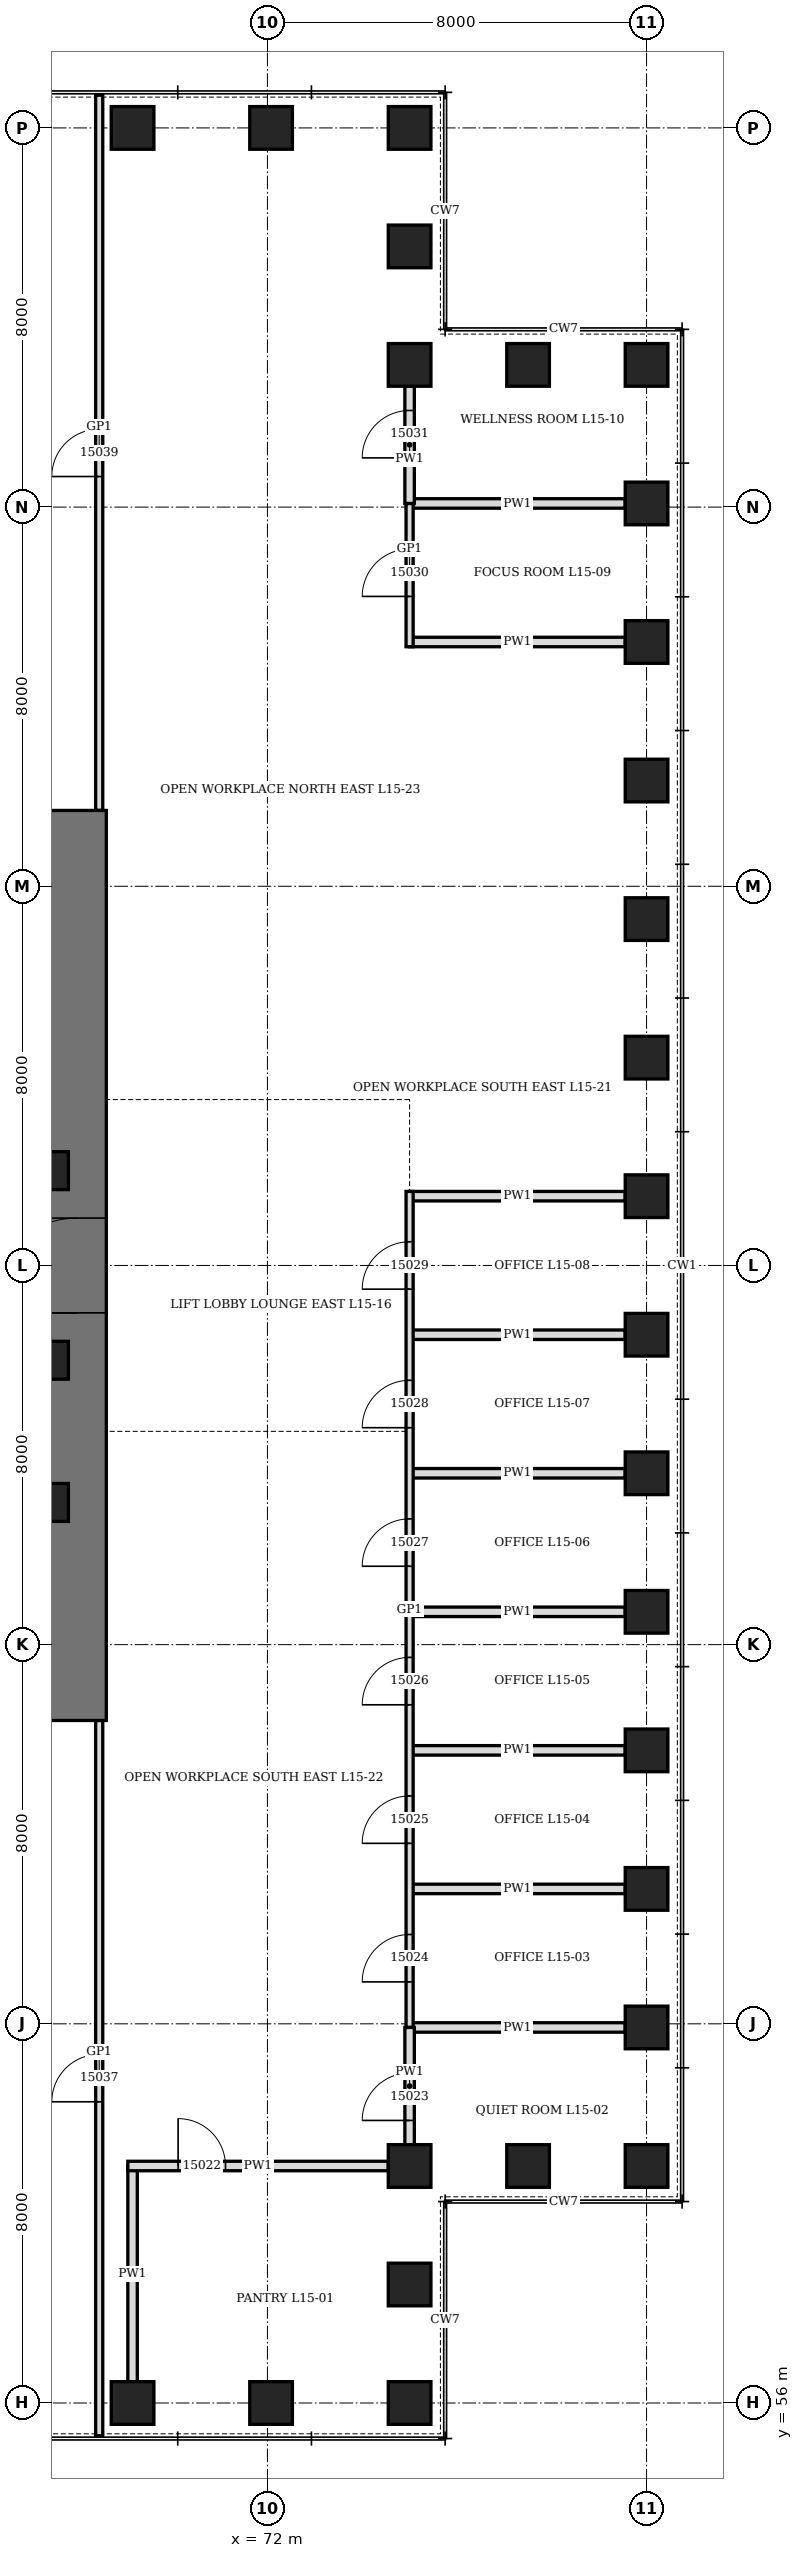
"""IFC4 building model, lengths in metres.
Left out: names, types, materials, properties, quantities, classifications, styles, units other than length and angle.
Written with IfcOpenShell. Run it as: python <this file> out.ifc"""

import sys

from ifc_helpers import new_model, si_unit, direction, frame, frame_2d, origin, origin_2d, place, context, subcontext, project, spatial, rectangle, hollow_rectangle, extrude, element, fill, save


model = new_model("IFC4")
c1 = context("Model", 3, precision=1e-05, world=origin(), true_north=direction((0.0, 1.0)))
c2 = subcontext(c1, "Body", "Model", "MODEL_VIEW")
j1 = project(units=[si_unit("LENGTHUNIT", "METRE"), si_unit("PLANEANGLEUNIT", "RADIAN")], contexts=[c1])
p1 = place(None, origin())
s1 = spatial("IfcSite", under=j1, at=p1, CompositionType="ELEMENT")
p2 = place(p1, origin())
s2 = spatial("IfcBuilding", under=s1, at=p2, CompositionType="ELEMENT")
p3 = place(p2, frame((0.0, 0.0, 72.7)))
s3 = spatial("IfcBuildingStorey", under=s2, at=p3, CompositionType="ELEMENT", Elevation=72.7)
for number, where, z_axis, x_axis in (
    (1, (69.154, 56.0, 0.0), (0.0, 0.0, 1.0), (1.0, 0.0, 0.0)),
    (2, (72.077, 56.0, 0.0), (0.0, 0.0, 1.0), (1.0, 0.0, 0.0)),
    (3, (75.0, 56.0, 0.0), (0.0, 0.0, 1.0), (0.0, 1.0, 0.0)),
    (4, (75.0, 58.5, 0.0), (0.0, 0.0, 1.0), (0.0, 1.0, 0.0)),
    (5, (75.0, 61.0, 0.0), (0.0, 0.0, 1.0), (1.0, 0.0, 0.0)),
    (6, (77.5, 61.0, 0.0), (0.0, 0.0, 1.0), (1.0, 0.0, 0.0)),
    (7, (80.0, 61.0, 0.0), (0.0, 0.0, 1.0), (0.0, 1.0, 0.0)),
    (8, (80.0, 63.923, 0.0), (0.0, 0.0, 1.0), (0.0, 1.0, 0.0)),
    (9, (80.0, 66.846, 0.0), (0.0, 0.0, 1.0), (0.0, 1.0, 0.0)),
    (10, (80.0, 69.769, 0.0), (0.0, 0.0, 1.0), (0.0, 1.0, 0.0)),
    (11, (80.0, 72.692, 0.0), (0.0, 0.0, 1.0), (0.0, 1.0, 0.0)),
    (12, (80.0, 75.615, 0.0), (0.0, 0.0, 1.0), (0.0, 1.0, 0.0)),
    (13, (80.0, 78.539, 0.0), (0.0, 0.0, 1.0), (0.0, 1.0, 0.0)),
    (14, (80.0, 81.461, 0.0), (0.0, 0.0, 1.0), (0.0, 1.0, 0.0)),
    (15, (80.0, 84.385, 0.0), (0.0, 0.0, 1.0), (0.0, 1.0, 0.0)),
    (16, (80.0, 87.308, 0.0), (0.0, 0.0, 1.0), (0.0, 1.0, 0.0)),
    (17, (80.0, 90.231, 0.0), (0.0, 0.0, 1.0), (0.0, 1.0, 0.0)),
    (18, (80.0, 93.154, 0.0), (0.0, 0.0, 1.0), (0.0, 1.0, 0.0)),
    (19, (80.0, 96.077, 0.0), (0.0, 0.0, 1.0), (0.0, 1.0, 0.0)),
    (20, (80.0, 99.0, 0.0), (0.0, 0.0, 1.0), (1.0, 0.0, 0.0)),
    (21, (77.5, 99.0, 0.0), (0.0, 0.0, 1.0), (1.0, 0.0, 0.0)),
    (22, (75.0, 99.0, 0.0), (0.0, 0.0, 1.0), (0.0, 1.0, 0.0)),
    (23, (75.0, 101.5, 0.0), (0.0, 0.0, 1.0), (0.0, 1.0, 0.0)),
    (24, (75.0, 104.0, 0.0), (0.0, 0.0, 1.0), (1.0, 0.0, 0.0)),
    (25, (72.077, 104.0, 0.0), (0.0, 0.0, 1.0), (1.0, 0.0, 0.0)),
    (26, (69.154, 104.0, 0.0), (0.0, 0.0, 1.0), (1.0, 0.0, 0.0)),
):
    element("IfcColumn", number, at=place(p3, frame(where, z_axis=z_axis, x_axis=x_axis)), inside=s3, PredefinedType="COLUMN", context=c2, shape_type="SweptSolid", body=[
        extrude(hollow_rectangle(XDim=0.9, YDim=0.9, WallThickness=0.12, at=origin_2d()), origin(), (0.0, 0.0, 1.0), 4.2),
    ])
p4 = place(p3, frame((68.0, 70.4, 0.0), z_axis=(0.0, 0.0, 1.0), x_axis=(0.0, 1.0, 0.0)))
e27 = element("IfcWall", 27, at=p4, inside=s3, PredefinedType="SHEAR", context=c2, shape_type="SweptSolid", body=[
    extrude(rectangle(XDim=19.2, YDim=1.2, at=frame_2d((9.6, 0.0))), origin(), (0.0, 0.0, 1.0), 4.2),
])
p5 = place(p4, frame((8.6, 0.0, 0.0)))
e28 = element("IfcOpeningElement", 28, at=p5, cuts=e27, PredefinedType="OPENING", context=c2, shape_type="SweptSolid", body=[
    extrude(rectangle(XDim=2.0, YDim=2.4, at=frame_2d((1.0, 1.2))), frame((0.0, 0.61, 0.0), z_axis=(0.0, -1.0, 0.0), x_axis=(1.0, 0.0, 0.0)), (0.0, 0.0, 1.0), 1.22),
])
for number, where, z_axis, x_axis in (
    (29, (67.4, 75.0, 0.0), (0.0, 0.0, 1.0), (1.0, 0.0, 0.0)),
    (30, (67.4, 78.0, 0.0), (0.0, 0.0, 1.0), (1.0, 0.0, 0.0)),
    (31, (67.4, 82.0, 0.0), (0.0, 0.0, 1.0), (1.0, 0.0, 0.0)),
):
    element("IfcColumn", number, at=place(p3, frame(where, z_axis=z_axis, x_axis=x_axis)), inside=s3, PredefinedType="COLUMN", context=c2, shape_type="SweptSolid", body=[
        extrude(hollow_rectangle(XDim=0.8, YDim=0.8, WallThickness=0.1, at=origin_2d()), origin(), (0.0, 0.0, 1.0), 4.2),
    ])
p6 = place(p3, frame((69.154, 56.45, 0.0), z_axis=(0.0, 0.0, 1.0), x_axis=(0.0, 1.0, 0.0)))
e32 = element("IfcWall", 32, at=p6, inside=s3, PredefinedType="PARTITIONING", context=c2, shape_type="SweptSolid", body=[
    extrude(rectangle(XDim=4.55, YDim=0.2, at=frame_2d((2.275, 0.0))), origin(), (0.0, 0.0, 1.0), 3.278),
])
for number, where, z_axis, x_axis in (
    (33, (75.0, 63.923, 0.0), (0.0, 0.0, 1.0), (1.0, 0.0, 0.0)),
    (34, (75.0, 66.846, 0.0), (0.0, 0.0, 1.0), (1.0, 0.0, 0.0)),
    (35, (75.0, 69.769, 0.0), (0.0, 0.0, 1.0), (1.0, 0.0, 0.0)),
    (36, (75.0, 72.692, 0.0), (0.0, 0.0, 1.0), (1.0, 0.0, 0.0)),
    (37, (75.0, 75.615, 0.0), (0.0, 0.0, 1.0), (1.0, 0.0, 0.0)),
    (38, (75.0, 78.539, 0.0), (0.0, 0.0, 1.0), (1.0, 0.0, 0.0)),
    (39, (75.0, 81.461, 0.0), (0.0, 0.0, 1.0), (1.0, 0.0, 0.0)),
    (40, (75.0, 93.154, 0.0), (0.0, 0.0, 1.0), (1.0, 0.0, 0.0)),
    (41, (75.0, 96.077, 0.0), (0.0, 0.0, 1.0), (1.0, 0.0, 0.0)),
):
    element("IfcWall", number, at=place(p3, frame(where, z_axis=z_axis, x_axis=x_axis)), inside=s3, PredefinedType="PARTITIONING", context=c2, shape_type="SweptSolid", body=[
        extrude(rectangle(XDim=4.55, YDim=0.2, at=frame_2d((2.275, 0.0))), origin(), (0.0, 0.0, 1.0), 3.428),
    ])
p7 = place(p3, frame((69.054, 61.0, 0.0), z_axis=(0.0, 0.0, 1.0), x_axis=(1.0, 0.0, 0.0)))
e42 = element("IfcWall", 42, at=p7, inside=s3, PredefinedType="PARTITIONING", context=c2, shape_type="SweptSolid", body=[
    extrude(rectangle(XDim=5.496, YDim=0.2, at=frame_2d((2.748, 0.0))), origin(), (0.0, 0.0, 1.0), 4.04),
])
p8 = place(p7, frame((1.062, 0.0, 0.0)))
e43 = element("IfcOpeningElement", 43, at=p8, cuts=e42, PredefinedType="OPENING", context=c2, shape_type="SweptSolid", body=[
    extrude(rectangle(XDim=1.0, YDim=2.1, at=frame_2d((0.5, 1.05))), frame((0.0, 0.11, 0.0), z_axis=(0.0, -1.0, 0.0), x_axis=(1.0, 0.0, 0.0)), (0.0, 0.0, 1.0), 0.22),
])
p9 = place(p3, frame((68.45, 55.31, 0.0), z_axis=(0.0, 0.0, 1.0), x_axis=(0.0, 1.0, 0.0)))
e44 = element("IfcWall", 44, at=p9, inside=s3, PredefinedType="PARTITIONING", context=c2, shape_type="SweptSolid", body=[
    extrude(rectangle(XDim=15.09, YDim=0.15, at=frame_2d((7.545, 0.0))), origin(), (0.0, 0.0, 1.0), 4.04),
])
p10 = place(p9, frame((7.045, 0.0, 0.0)))
e45 = element("IfcOpeningElement", 45, at=p10, cuts=e44, PredefinedType="OPENING", context=c2, shape_type="SweptSolid", body=[
    extrude(rectangle(XDim=1.0, YDim=2.4, at=frame_2d((0.5, 1.2))), frame((0.0, 0.085, 0.0), z_axis=(0.0, -1.0, 0.0), x_axis=(1.0, 0.0, 0.0)), (0.0, 0.0, 1.0), 0.17),
])
p11 = place(p3, frame((68.45, 89.6, 0.0), z_axis=(0.0, 0.0, 1.0), x_axis=(0.0, 1.0, 0.0)))
e46 = element("IfcWall", 46, at=p11, inside=s3, PredefinedType="PARTITIONING", context=c2, shape_type="SweptSolid", body=[
    extrude(rectangle(XDim=15.09, YDim=0.15, at=frame_2d((7.545, 0.0))), origin(), (0.0, 0.0, 1.0), 4.04),
])
p12 = place(p11, frame((7.045, 0.0, 0.0)))
e47 = element("IfcOpeningElement", 47, at=p12, cuts=e46, PredefinedType="OPENING", context=c2, shape_type="SweptSolid", body=[
    extrude(rectangle(XDim=1.0, YDim=2.4, at=frame_2d((0.5, 1.2))), frame((0.0, 0.085, 0.0), z_axis=(0.0, -1.0, 0.0), x_axis=(1.0, 0.0, 0.0)), (0.0, 0.0, 1.0), 0.17),
])
p13 = place(p3, frame((75.0, 63.923, 0.0), z_axis=(0.0, 0.0, 1.0), x_axis=(0.0, 1.0, 0.0)))
e48 = element("IfcWall", 48, at=p13, inside=s3, PredefinedType="PARTITIONING", context=c2, shape_type="SweptSolid", body=[
    extrude(rectangle(XDim=17.638, YDim=0.15, at=frame_2d((8.819, 0.0))), origin(), (0.0, 0.0, 1.0), 4.04),
])
p14 = place(p13, frame((0.961, 0.0, 0.0)))
e49 = element("IfcOpeningElement", 49, at=p14, cuts=e48, PredefinedType="OPENING", context=c2, shape_type="SweptSolid", body=[
    extrude(rectangle(XDim=1.0, YDim=2.1, at=frame_2d((0.5, 1.05))), frame((0.0, 0.085, 0.0), z_axis=(0.0, -1.0, 0.0), x_axis=(1.0, 0.0, 0.0)), (0.0, 0.0, 1.0), 0.17),
])
p15 = place(p13, frame((3.885, 0.0, 0.0)))
e50 = element("IfcOpeningElement", 50, at=p15, cuts=e48, PredefinedType="OPENING", context=c2, shape_type="SweptSolid", body=[
    extrude(rectangle(XDim=1.0, YDim=2.1, at=frame_2d((0.5, 1.05))), frame((0.0, 0.085, 0.0), z_axis=(0.0, -1.0, 0.0), x_axis=(1.0, 0.0, 0.0)), (0.0, 0.0, 1.0), 0.17),
])
p16 = place(p13, frame((6.808, 0.0, 0.0)))
e51 = element("IfcOpeningElement", 51, at=p16, cuts=e48, PredefinedType="OPENING", context=c2, shape_type="SweptSolid", body=[
    extrude(rectangle(XDim=1.0, YDim=2.1, at=frame_2d((0.5, 1.05))), frame((0.0, 0.085, 0.0), z_axis=(0.0, -1.0, 0.0), x_axis=(1.0, 0.0, 0.0)), (0.0, 0.0, 1.0), 0.17),
])
p17 = place(p13, frame((9.731, 0.0, 0.0)))
e52 = element("IfcOpeningElement", 52, at=p17, cuts=e48, PredefinedType="OPENING", context=c2, shape_type="SweptSolid", body=[
    extrude(rectangle(XDim=1.0, YDim=2.1, at=frame_2d((0.5, 1.05))), frame((0.0, 0.085, 0.0), z_axis=(0.0, -1.0, 0.0), x_axis=(1.0, 0.0, 0.0)), (0.0, 0.0, 1.0), 0.17),
])
p18 = place(p13, frame((12.654, 0.0, 0.0)))
e53 = element("IfcOpeningElement", 53, at=p18, cuts=e48, PredefinedType="OPENING", context=c2, shape_type="SweptSolid", body=[
    extrude(rectangle(XDim=1.0, YDim=2.1, at=frame_2d((0.5, 1.05))), frame((0.0, 0.085, 0.0), z_axis=(0.0, -1.0, 0.0), x_axis=(1.0, 0.0, 0.0)), (0.0, 0.0, 1.0), 0.17),
])
p19 = place(p13, frame((15.577, 0.0, 0.0)))
e54 = element("IfcOpeningElement", 54, at=p19, cuts=e48, PredefinedType="OPENING", context=c2, shape_type="SweptSolid", body=[
    extrude(rectangle(XDim=1.0, YDim=2.1, at=frame_2d((0.5, 1.05))), frame((0.0, 0.085, 0.0), z_axis=(0.0, -1.0, 0.0), x_axis=(1.0, 0.0, 0.0)), (0.0, 0.0, 1.0), 0.17),
])
p20 = place(p3, frame((75.0, 93.054, 0.0), z_axis=(0.0, 0.0, 1.0), x_axis=(0.0, 1.0, 0.0)))
e55 = element("IfcWall", 55, at=p20, inside=s3, PredefinedType="PARTITIONING", context=c2, shape_type="SweptSolid", body=[
    extrude(rectangle(XDim=3.023, YDim=0.15, at=frame_2d((1.511, 0.0))), origin(), (0.0, 0.0, 1.0), 4.04),
])
p21 = place(p20, frame((1.062, 0.0, 0.0)))
e56 = element("IfcOpeningElement", 56, at=p21, cuts=e55, PredefinedType="OPENING", context=c2, shape_type="SweptSolid", body=[
    extrude(rectangle(XDim=1.0, YDim=2.4, at=frame_2d((0.5, 1.2))), frame((0.0, 0.085, 0.0), z_axis=(0.0, -1.0, 0.0), x_axis=(1.0, 0.0, 0.0)), (0.0, 0.0, 1.0), 0.17),
])
p22 = place(p3, frame((75.0, 61.45, 0.0), z_axis=(0.0, 0.0, 1.0), x_axis=(0.0, 1.0, 0.0)))
e57 = element("IfcWall", 57, at=p22, inside=s3, PredefinedType="PARTITIONING", context=c2, shape_type="SweptSolid", body=[
    extrude(rectangle(XDim=2.473, YDim=0.2, at=frame_2d((1.237, 0.0))), origin(), (0.0, 0.0, 1.0), 4.04),
])
p23 = place(p22, frame((0.511, 0.0, 0.0)))
e58 = element("IfcOpeningElement", 58, at=p23, cuts=e57, PredefinedType="OPENING", context=c2, shape_type="SweptSolid", body=[
    extrude(rectangle(XDim=1.0, YDim=2.1, at=frame_2d((0.5, 1.05))), frame((0.0, 0.11, 0.0), z_axis=(0.0, -1.0, 0.0), x_axis=(1.0, 0.0, 0.0)), (0.0, 0.0, 1.0), 0.22),
])
p24 = place(p3, frame((75.0, 96.077, 0.0), z_axis=(0.0, 0.0, 1.0), x_axis=(0.0, 1.0, 0.0)))
e59 = element("IfcWall", 59, at=p24, inside=s3, PredefinedType="PARTITIONING", context=c2, shape_type="SweptSolid", body=[
    extrude(rectangle(XDim=2.473, YDim=0.2, at=frame_2d((1.237, 0.0))), origin(), (0.0, 0.0, 1.0), 4.04),
])
p25 = place(p24, frame((0.961, 0.0, 0.0)))
e60 = element("IfcOpeningElement", 60, at=p25, cuts=e59, PredefinedType="OPENING", context=c2, shape_type="SweptSolid", body=[
    extrude(rectangle(XDim=1.0, YDim=2.1, at=frame_2d((0.5, 1.05))), frame((0.0, 0.11, 0.0), z_axis=(0.0, -1.0, 0.0), x_axis=(1.0, 0.0, 0.0)), (0.0, 0.0, 1.0), 0.22),
])
p26 = place(p5, origin())
e61 = element("IfcDoor", 61, at=p26, inside=s3, OperationType="DOUBLE_DOOR_SINGLE_SWING", PredefinedType="DOOR", context=c2, shape_type="SweptSolid", body=[
    extrude(rectangle(XDim=2.0, YDim=2.4, at=frame_2d((1.0, 1.2))), frame((0.0, 0.35, 0.0), z_axis=(0.0, -1.0, 0.0), x_axis=(1.0, 0.0, 0.0)), (0.0, 0.0, 1.0), 0.7),
])
fill(e28, e61)
p27 = place(p8, origin())
e62 = element("IfcDoor", 62, at=p27, inside=s3, OperationType="SINGLE_SWING_LEFT", PredefinedType="DOOR", context=c2, shape_type="SweptSolid", body=[
    extrude(rectangle(XDim=1.0, YDim=2.1, at=frame_2d((0.5, 1.05))), frame((0.0, 0.1, 0.0), z_axis=(0.0, -1.0, 0.0), x_axis=(1.0, 0.0, 0.0)), (0.0, 0.0, 1.0), 0.199),
])
fill(e43, e62)
p28 = place(p23, origin())
e63 = element("IfcDoor", 63, at=p28, inside=s3, OperationType="SINGLE_SWING_LEFT", PredefinedType="DOOR", context=c2, shape_type="SweptSolid", body=[
    extrude(rectangle(XDim=1.0, YDim=2.1, at=frame_2d((0.5, 1.05))), frame((0.0, 0.1, 0.0), z_axis=(0.0, -1.0, 0.0), x_axis=(1.0, 0.0, 0.0)), (0.0, 0.0, 1.0), 0.199),
])
fill(e58, e63)
p29 = place(p14, origin())
e64 = element("IfcDoor", 64, at=p29, inside=s3, OperationType="SINGLE_SWING_LEFT", PredefinedType="DOOR", context=c2, shape_type="SweptSolid", body=[
    extrude(rectangle(XDim=1.0, YDim=2.1, at=frame_2d((0.5, 1.05))), frame((0.0, 0.075, 0.0), z_axis=(0.0, -1.0, 0.0), x_axis=(1.0, 0.0, 0.0)), (0.0, 0.0, 1.0), 0.149),
])
fill(e49, e64)
p30 = place(p15, origin())
e65 = element("IfcDoor", 65, at=p30, inside=s3, OperationType="SINGLE_SWING_LEFT", PredefinedType="DOOR", context=c2, shape_type="SweptSolid", body=[
    extrude(rectangle(XDim=1.0, YDim=2.1, at=frame_2d((0.5, 1.05))), frame((0.0, 0.075, 0.0), z_axis=(0.0, -1.0, 0.0), x_axis=(1.0, 0.0, 0.0)), (0.0, 0.0, 1.0), 0.149),
])
fill(e50, e65)
p31 = place(p16, origin())
e66 = element("IfcDoor", 66, at=p31, inside=s3, OperationType="SINGLE_SWING_LEFT", PredefinedType="DOOR", context=c2, shape_type="SweptSolid", body=[
    extrude(rectangle(XDim=1.0, YDim=2.1, at=frame_2d((0.5, 1.05))), frame((0.0, 0.075, 0.0), z_axis=(0.0, -1.0, 0.0), x_axis=(1.0, 0.0, 0.0)), (0.0, 0.0, 1.0), 0.149),
])
fill(e51, e66)
p32 = place(p17, origin())
e67 = element("IfcDoor", 67, at=p32, inside=s3, OperationType="SINGLE_SWING_LEFT", PredefinedType="DOOR", context=c2, shape_type="SweptSolid", body=[
    extrude(rectangle(XDim=1.0, YDim=2.1, at=frame_2d((0.5, 1.05))), frame((0.0, 0.075, 0.0), z_axis=(0.0, -1.0, 0.0), x_axis=(1.0, 0.0, 0.0)), (0.0, 0.0, 1.0), 0.149),
])
fill(e52, e67)
p33 = place(p18, origin())
e68 = element("IfcDoor", 68, at=p33, inside=s3, OperationType="SINGLE_SWING_LEFT", PredefinedType="DOOR", context=c2, shape_type="SweptSolid", body=[
    extrude(rectangle(XDim=1.0, YDim=2.1, at=frame_2d((0.5, 1.05))), frame((0.0, 0.075, 0.0), z_axis=(0.0, -1.0, 0.0), x_axis=(1.0, 0.0, 0.0)), (0.0, 0.0, 1.0), 0.149),
])
fill(e53, e68)
p34 = place(p19, origin())
e69 = element("IfcDoor", 69, at=p34, inside=s3, OperationType="SINGLE_SWING_LEFT", PredefinedType="DOOR", context=c2, shape_type="SweptSolid", body=[
    extrude(rectangle(XDim=1.0, YDim=2.1, at=frame_2d((0.5, 1.05))), frame((0.0, 0.075, 0.0), z_axis=(0.0, -1.0, 0.0), x_axis=(1.0, 0.0, 0.0)), (0.0, 0.0, 1.0), 0.149),
])
fill(e54, e69)
p35 = place(p21, origin())
e70 = element("IfcDoor", 70, at=p35, inside=s3, OperationType="SINGLE_SWING_RIGHT", PredefinedType="DOOR", context=c2, shape_type="SweptSolid", body=[
    extrude(rectangle(XDim=1.0, YDim=2.4, at=frame_2d((0.5, 1.2))), frame((0.0, 0.075, 0.0), z_axis=(0.0, -1.0, 0.0), x_axis=(1.0, 0.0, 0.0)), (0.0, 0.0, 1.0), 0.149),
])
fill(e56, e70)
p36 = place(p25, origin())
e71 = element("IfcDoor", 71, at=p36, inside=s3, OperationType="SINGLE_SWING_LEFT", PredefinedType="DOOR", context=c2, shape_type="SweptSolid", body=[
    extrude(rectangle(XDim=1.0, YDim=2.1, at=frame_2d((0.5, 1.05))), frame((0.0, 0.1, 0.0), z_axis=(0.0, -1.0, 0.0), x_axis=(1.0, 0.0, 0.0)), (0.0, 0.0, 1.0), 0.199),
])
fill(e60, e71)
p37 = place(p10, origin())
e72 = element("IfcDoor", 72, at=p37, inside=s3, OperationType="SINGLE_SWING_RIGHT", PredefinedType="DOOR", context=c2, shape_type="SweptSolid", body=[
    extrude(rectangle(XDim=1.0, YDim=2.4, at=frame_2d((0.5, 1.2))), frame((0.0, 0.075, 0.0), z_axis=(0.0, -1.0, 0.0), x_axis=(1.0, 0.0, 0.0)), (0.0, 0.0, 1.0), 0.149),
])
fill(e45, e72)
p38 = place(p12, origin())
e73 = element("IfcDoor", 73, at=p38, inside=s3, OperationType="SINGLE_SWING_RIGHT", PredefinedType="DOOR", context=c2, shape_type="SweptSolid", body=[
    extrude(rectangle(XDim=1.0, YDim=2.4, at=frame_2d((0.5, 1.2))), frame((0.0, 0.075, 0.0), z_axis=(0.0, -1.0, 0.0), x_axis=(1.0, 0.0, 0.0)), (0.0, 0.0, 1.0), 0.149),
])
fill(e47, e73)
save(model, sys.argv[1])
